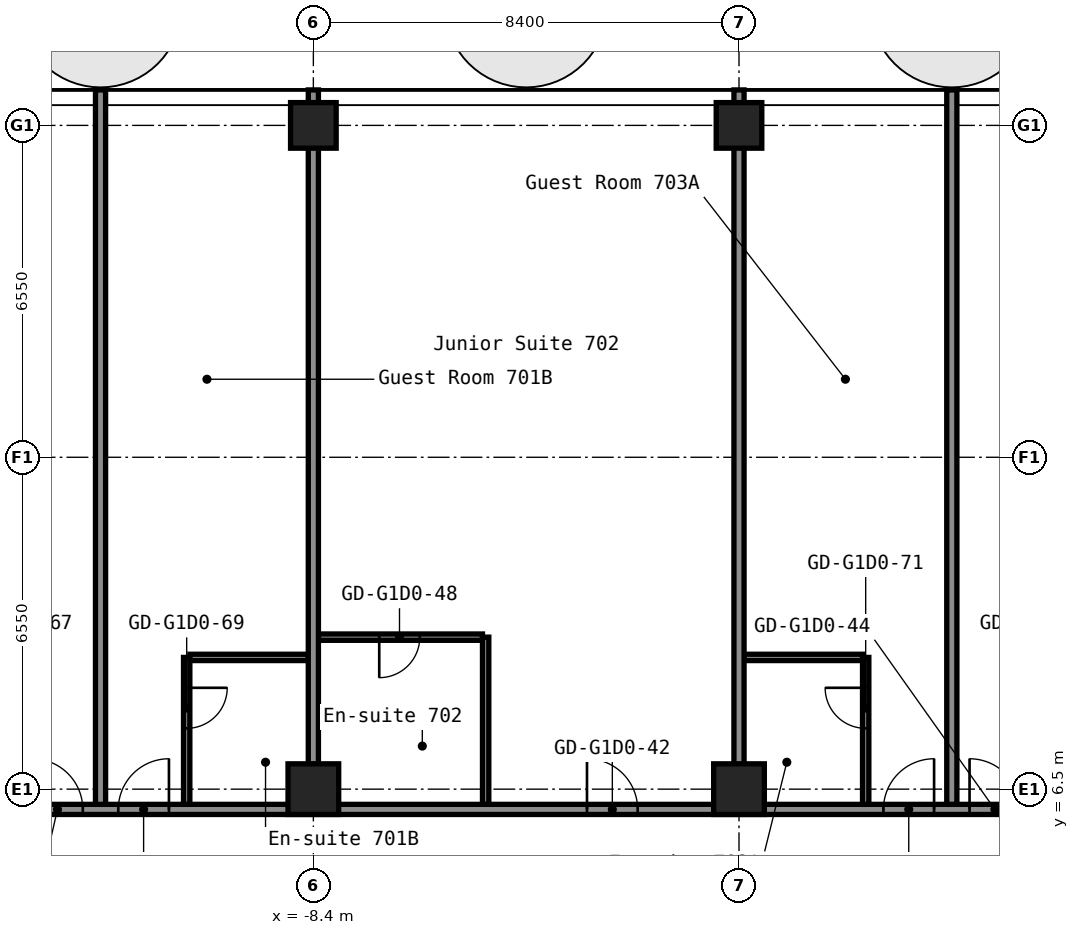
"""IFC4 building model, lengths in metres.
Left out: names, types, materials, properties, quantities, classifications, styles, units other than length and angle.
Written with IfcOpenShell. Run it as: python <this file> out.ifc"""

import sys

from ifc_helpers import new_model, si_unit, direction, frame, frame_2d, origin, origin_2d, place, context, subcontext, project, spatial, rectangle, hollow_rectangle, extrude, element, fill, save


model = new_model("IFC4")
c1 = context("Model", 3, precision=1e-05, world=origin(), true_north=direction((0.0, 1.0)))
c2 = subcontext(c1, "Body", "Model", "MODEL_VIEW")
j1 = project(units=[si_unit("LENGTHUNIT", "METRE"), si_unit("PLANEANGLEUNIT", "RADIAN")], contexts=[c1])
p1 = place(None, origin())
s1 = spatial("IfcSite", under=j1, at=p1, CompositionType="ELEMENT")
p2 = place(p1, origin())
s2 = spatial("IfcBuilding", under=s1, at=p2, CompositionType="ELEMENT")
p3 = place(p2, frame((0.0, 0.0, 29.4)))
s3 = spatial("IfcBuildingStorey", under=s2, at=p3, CompositionType="ELEMENT", Elevation=29.4)
p4 = place(p3, frame((-8.4, 6.5, 0.0), z_axis=(0.0, 0.0, 1.0), x_axis=(1.0, 0.0, 0.0)))
e1 = element("IfcColumn", 1, at=p4, inside=s3, PredefinedType="COLUMN", context=c2, shape_type="SweptSolid", body=[
    extrude(hollow_rectangle(XDim=1.0, YDim=1.0, WallThickness=0.04, at=origin_2d()), origin(), (0.0, 0.0, 1.0), 2.8),
])
p5 = place(p3, frame((-8.4, 19.6, 0.0), z_axis=(0.0, 0.0, 1.0), x_axis=(1.0, 0.0, 0.0)))
e2 = element("IfcColumn", 2, at=p5, inside=s3, PredefinedType="COLUMN", context=c2, shape_type="SweptSolid", body=[
    extrude(hollow_rectangle(XDim=0.9, YDim=0.9, WallThickness=0.036, at=origin_2d()), origin(), (0.0, 0.0, 1.0), 2.8),
])
p6 = place(p3, frame((0.0, 6.5, 0.0), z_axis=(0.0, 0.0, 1.0), x_axis=(1.0, 0.0, 0.0)))
e3 = element("IfcColumn", 3, at=p6, inside=s3, PredefinedType="COLUMN", context=c2, shape_type="SweptSolid", body=[
    extrude(hollow_rectangle(XDim=1.0, YDim=1.0, WallThickness=0.04, at=origin_2d()), origin(), (0.0, 0.0, 1.0), 2.8),
])
p7 = place(p3, frame((0.0, 19.6, 0.0), z_axis=(0.0, 0.0, 1.0), x_axis=(1.0, 0.0, 0.0)))
e4 = element("IfcColumn", 4, at=p7, inside=s3, PredefinedType="COLUMN", context=c2, shape_type="SweptSolid", body=[
    extrude(hollow_rectangle(XDim=0.9, YDim=0.9, WallThickness=0.036, at=origin_2d()), origin(), (0.0, 0.0, 1.0), 2.8),
])
p8 = place(p3, frame((-16.8, 6.1, 0.0), z_axis=(0.0, 0.0, 1.0), x_axis=(1.0, 0.0, 0.0)))
e5 = element("IfcWall", 5, at=p8, inside=s3, PredefinedType="PARTITIONING", context=c2, shape_type="SweptSolid", body=[
    extrude(rectangle(XDim=33.6, YDim=0.2, at=frame_2d((16.8, 0.0))), origin(), (0.0, 0.0, 1.0), 2.8),
])
p9 = place(p8, frame((2.85, 0.0, 0.0)))
e6 = element("IfcOpeningElement", 6, at=p9, cuts=e5, PredefinedType="OPENING", context=c2, shape_type="SweptSolid", body=[
    extrude(rectangle(XDim=1.0, YDim=2.1, at=frame_2d((0.5, 1.05))), frame((0.0, 0.11, 0.0), z_axis=(0.0, -1.0, 0.0), x_axis=(1.0, 0.0, 0.0)), (0.0, 0.0, 1.0), 0.22),
])
p10 = place(p8, frame((4.55, 0.0, 0.0)))
e7 = element("IfcOpeningElement", 7, at=p10, cuts=e5, PredefinedType="OPENING", context=c2, shape_type="SweptSolid", body=[
    extrude(rectangle(XDim=1.0, YDim=2.1, at=frame_2d((0.5, 1.05))), frame((0.0, 0.11, 0.0), z_axis=(0.0, -1.0, 0.0), x_axis=(1.0, 0.0, 0.0)), (0.0, 0.0, 1.0), 0.22),
])
p11 = place(p8, frame((13.8, 0.0, 0.0)))
e8 = element("IfcOpeningElement", 8, at=p11, cuts=e5, PredefinedType="OPENING", context=c2, shape_type="SweptSolid", body=[
    extrude(rectangle(XDim=1.0, YDim=2.1, at=frame_2d((0.5, 1.05))), frame((0.0, 0.11, 0.0), z_axis=(0.0, -1.0, 0.0), x_axis=(1.0, 0.0, 0.0)), (0.0, 0.0, 1.0), 0.22),
])
p12 = place(p8, frame((19.65, 0.0, 0.0)))
e9 = element("IfcOpeningElement", 9, at=p12, cuts=e5, PredefinedType="OPENING", context=c2, shape_type="SweptSolid", body=[
    extrude(rectangle(XDim=1.0, YDim=2.1, at=frame_2d((0.5, 1.05))), frame((0.0, 0.11, 0.0), z_axis=(0.0, -1.0, 0.0), x_axis=(1.0, 0.0, 0.0)), (0.0, 0.0, 1.0), 0.22),
])
p13 = place(p8, frame((21.35, 0.0, 0.0)))
e10 = element("IfcOpeningElement", 10, at=p13, cuts=e5, PredefinedType="OPENING", context=c2, shape_type="SweptSolid", body=[
    extrude(rectangle(XDim=1.0, YDim=2.1, at=frame_2d((0.5, 1.05))), frame((0.0, 0.11, 0.0), z_axis=(0.0, -1.0, 0.0), x_axis=(1.0, 0.0, 0.0)), (0.0, 0.0, 1.0), 0.22),
])
p14 = place(p8, frame((27.2, 0.0, 0.0)))
e11 = element("IfcOpeningElement", 11, at=p14, cuts=e5, PredefinedType="OPENING", context=c2, shape_type="SweptSolid", body=[
    extrude(rectangle(XDim=1.0, YDim=2.1, at=frame_2d((0.5, 1.05))), frame((0.0, 0.11, 0.0), z_axis=(0.0, -1.0, 0.0), x_axis=(1.0, 0.0, 0.0)), (0.0, 0.0, 1.0), 0.22),
])
for number, where, z_axis, x_axis in (
    (12, (-10.837, 9.1, 0.0), (0.0, 0.0, 1.0), (1.0, 0.0, 0.0)),
    (13, (0.1, 9.1, 0.0), (0.0, 0.0, 1.0), (1.0, 0.0, 0.0)),
):
    element("IfcWall", number, at=place(p3, frame(where, z_axis=z_axis, x_axis=x_axis)), inside=s3, PredefinedType="PARTITIONING", context=c2, shape_type="SweptSolid", body=[
        extrude(rectangle(XDim=2.337, YDim=0.125, at=frame_2d((1.169, 0.0))), origin(), (0.0, 0.0, 1.0), 2.8),
    ])
p15 = place(p3, frame((-8.3, 9.5, 0.0), z_axis=(0.0, 0.0, 1.0), x_axis=(1.0, 0.0, 0.0)))
e14 = element("IfcWall", 14, at=p15, inside=s3, PredefinedType="PARTITIONING", context=c2, shape_type="SweptSolid", body=[
    extrude(rectangle(XDim=3.238, YDim=0.125, at=frame_2d((1.619, 0.0))), origin(), (0.0, 0.0, 1.0), 2.8),
])
p16 = place(p15, frame((1.2, 0.0, 0.0)))
e15 = element("IfcOpeningElement", 15, at=p16, cuts=e14, PredefinedType="OPENING", context=c2, shape_type="SweptSolid", body=[
    extrude(rectangle(XDim=0.8, YDim=2.1, at=frame_2d((0.4, 1.05))), frame((0.0, 0.073, 0.0), z_axis=(0.0, -1.0, 0.0), x_axis=(1.0, 0.0, 0.0)), (0.0, 0.0, 1.0), 0.145),
])
p17 = place(p3, frame((-12.6, 6.2, 0.0), z_axis=(0.0, 0.0, 1.0), x_axis=(0.0, 1.0, 0.0)))
e16 = element("IfcWall", 16, at=p17, inside=s3, PredefinedType="PARTITIONING", context=c2, shape_type="SweptSolid", body=[
    extrude(rectangle(XDim=14.1, YDim=0.2, at=frame_2d((7.05, 0.0))), origin(), (0.0, 0.0, 1.0), 2.8),
])
p18 = place(p3, frame((-10.9, 6.2, 0.0), z_axis=(0.0, 0.0, 1.0), x_axis=(0.0, 1.0, 0.0)))
e17 = element("IfcWall", 17, at=p18, inside=s3, PredefinedType="PARTITIONING", context=c2, shape_type="SweptSolid", body=[
    extrude(rectangle(XDim=2.9, YDim=0.125, at=frame_2d((1.45, 0.0))), origin(), (0.0, 0.0, 1.0), 2.8),
])
p19 = place(p18, frame((1.5, 0.0, 0.0)))
e18 = element("IfcOpeningElement", 18, at=p19, cuts=e17, PredefinedType="OPENING", context=c2, shape_type="SweptSolid", body=[
    extrude(rectangle(XDim=0.8, YDim=2.1, at=frame_2d((0.4, 1.05))), frame((0.0, 0.073, 0.0), z_axis=(0.0, -1.0, 0.0), x_axis=(1.0, 0.0, 0.0)), (0.0, 0.0, 1.0), 0.145),
])
p20 = place(p3, frame((-8.4, 6.99, 0.0), z_axis=(0.0, 0.0, 1.0), x_axis=(0.0, 1.0, 0.0)))
e19 = element("IfcWall", 19, at=p20, inside=s3, PredefinedType="PARTITIONING", context=c2, shape_type="SweptSolid", body=[
    extrude(rectangle(XDim=13.31, YDim=0.2, at=frame_2d((6.655, 0.0))), origin(), (0.0, 0.0, 1.0), 2.8),
])
p21 = place(p3, frame((-5.0, 6.2, 0.0), z_axis=(0.0, 0.0, 1.0), x_axis=(0.0, 1.0, 0.0)))
e20 = element("IfcWall", 20, at=p21, inside=s3, PredefinedType="PARTITIONING", context=c2, shape_type="SweptSolid", body=[
    extrude(rectangle(XDim=3.3, YDim=0.125, at=frame_2d((1.65, 0.0))), origin(), (0.0, 0.0, 1.0), 2.8),
])
p22 = place(p3, frame((0.0, 6.99, 0.0), z_axis=(0.0, 0.0, 1.0), x_axis=(0.0, 1.0, 0.0)))
e21 = element("IfcWall", 21, at=p22, inside=s3, PredefinedType="PARTITIONING", context=c2, shape_type="SweptSolid", body=[
    extrude(rectangle(XDim=13.31, YDim=0.2, at=frame_2d((6.655, 0.0))), origin(), (0.0, 0.0, 1.0), 2.8),
])
p23 = place(p3, frame((2.5, 6.2, 0.0), z_axis=(0.0, 0.0, 1.0), x_axis=(0.0, 1.0, 0.0)))
e22 = element("IfcWall", 22, at=p23, inside=s3, PredefinedType="PARTITIONING", context=c2, shape_type="SweptSolid", body=[
    extrude(rectangle(XDim=2.9, YDim=0.125, at=frame_2d((1.45, 0.0))), origin(), (0.0, 0.0, 1.0), 2.8),
])
p24 = place(p23, frame((1.5, 0.0, 0.0)))
e23 = element("IfcOpeningElement", 23, at=p24, cuts=e22, PredefinedType="OPENING", context=c2, shape_type="SweptSolid", body=[
    extrude(rectangle(XDim=0.8, YDim=2.1, at=frame_2d((0.4, 1.05))), frame((0.0, 0.073, 0.0), z_axis=(0.0, -1.0, 0.0), x_axis=(1.0, 0.0, 0.0)), (0.0, 0.0, 1.0), 0.145),
])
p25 = place(p3, frame((4.2, 6.2, 0.0), z_axis=(0.0, 0.0, 1.0), x_axis=(0.0, 1.0, 0.0)))
e24 = element("IfcWall", 24, at=p25, inside=s3, PredefinedType="PARTITIONING", context=c2, shape_type="SweptSolid", body=[
    extrude(rectangle(XDim=14.1, YDim=0.2, at=frame_2d((7.05, 0.0))), origin(), (0.0, 0.0, 1.0), 2.8),
])
p26 = place(p9, origin())
e25 = element("IfcDoor", 25, at=p26, inside=s3, OperationType="SINGLE_SWING_RIGHT", PredefinedType="DOOR", context=c2, shape_type="SweptSolid", body=[
    extrude(rectangle(XDim=1.0, YDim=2.1, at=frame_2d((0.5, 1.05))), frame((0.0, 0.025, 0.0), z_axis=(0.0, -1.0, 0.0), x_axis=(1.0, 0.0, 0.0)), (0.0, 0.0, 1.0), 0.05),
])
fill(e6, e25)
p27 = place(p10, origin())
e26 = element("IfcDoor", 26, at=p27, inside=s3, OperationType="SINGLE_SWING_LEFT", PredefinedType="DOOR", context=c2, shape_type="SweptSolid", body=[
    extrude(rectangle(XDim=1.0, YDim=2.1, at=frame_2d((0.5, 1.05))), frame((0.0, 0.025, 0.0), z_axis=(0.0, -1.0, 0.0), x_axis=(1.0, 0.0, 0.0)), (0.0, 0.0, 1.0), 0.05),
])
fill(e7, e26)
p28 = place(p11, origin())
e27 = element("IfcDoor", 27, at=p28, inside=s3, OperationType="SINGLE_SWING_RIGHT", PredefinedType="DOOR", context=c2, shape_type="SweptSolid", body=[
    extrude(rectangle(XDim=1.0, YDim=2.1, at=frame_2d((0.5, 1.05))), frame((0.0, 0.025, 0.0), z_axis=(0.0, -1.0, 0.0), x_axis=(1.0, 0.0, 0.0)), (0.0, 0.0, 1.0), 0.05),
])
fill(e8, e27)
p29 = place(p12, origin())
e28 = element("IfcDoor", 28, at=p29, inside=s3, OperationType="SINGLE_SWING_LEFT", PredefinedType="DOOR", context=c2, shape_type="SweptSolid", body=[
    extrude(rectangle(XDim=1.0, YDim=2.1, at=frame_2d((0.5, 1.05))), frame((0.0, 0.025, 0.0), z_axis=(0.0, -1.0, 0.0), x_axis=(1.0, 0.0, 0.0)), (0.0, 0.0, 1.0), 0.05),
])
fill(e9, e28)
p30 = place(p13, origin())
e29 = element("IfcDoor", 29, at=p30, inside=s3, OperationType="SINGLE_SWING_RIGHT", PredefinedType="DOOR", context=c2, shape_type="SweptSolid", body=[
    extrude(rectangle(XDim=1.0, YDim=2.1, at=frame_2d((0.5, 1.05))), frame((0.0, 0.025, 0.0), z_axis=(0.0, -1.0, 0.0), x_axis=(1.0, 0.0, 0.0)), (0.0, 0.0, 1.0), 0.05),
])
fill(e10, e29)
p31 = place(p16, origin())
e30 = element("IfcDoor", 30, at=p31, inside=s3, OperationType="SINGLE_SWING_LEFT", PredefinedType="DOOR", context=c2, shape_type="SweptSolid", body=[
    extrude(rectangle(XDim=0.8, YDim=2.1, at=frame_2d((0.4, 1.05))), frame((0.0, 0.025, 0.0), z_axis=(0.0, -1.0, 0.0), x_axis=(1.0, 0.0, 0.0)), (0.0, 0.0, 1.0), 0.05),
])
fill(e15, e30)
p32 = place(p19, origin())
e31 = element("IfcDoor", 31, at=p32, inside=s3, OperationType="SINGLE_SWING_RIGHT", PredefinedType="DOOR", context=c2, shape_type="SweptSolid", body=[
    extrude(rectangle(XDim=0.8, YDim=2.1, at=frame_2d((0.4, 1.05))), frame((0.0, 0.025, 0.0), z_axis=(0.0, -1.0, 0.0), x_axis=(1.0, 0.0, 0.0)), (0.0, 0.0, 1.0), 0.05),
])
fill(e18, e31)
p33 = place(p24, origin())
e32 = element("IfcDoor", 32, at=p33, inside=s3, OperationType="SINGLE_SWING_LEFT", PredefinedType="DOOR", context=c2, shape_type="SweptSolid", body=[
    extrude(rectangle(XDim=0.8, YDim=2.1, at=frame_2d((0.4, 1.05))), frame((0.0, 0.025, 0.0), z_axis=(0.0, -1.0, 0.0), x_axis=(1.0, 0.0, 0.0)), (0.0, 0.0, 1.0), 0.05),
])
fill(e23, e32)
save(model, sys.argv[1])
